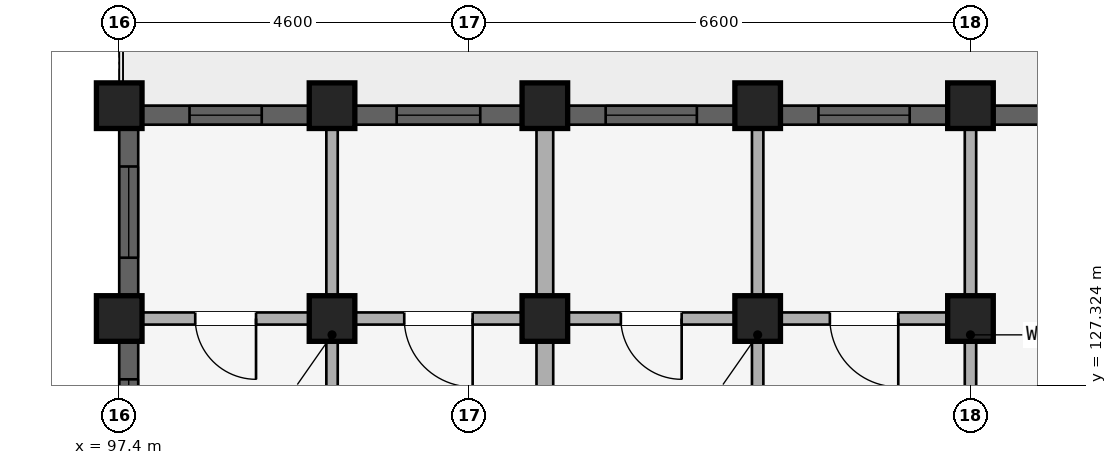
"""IFC4 building model, lengths in metres.
Left out: names, types, materials, properties, quantities, classifications, styles, units other than length and angle.
Written with IfcOpenShell. Run it as: python <this file> out.ifc"""

import sys

from ifc_helpers import new_model, si_unit, direction, frame, frame_2d, origin, origin_2d, place, context, subcontext, project, spatial, rectangle, extrude, element, fill, save


model = new_model("IFC4")
c1 = context("Model", 3, precision=1e-05, world=origin(), true_north=direction((0.0, 1.0)))
c2 = subcontext(c1, "Body", "Model", "MODEL_VIEW")
j1 = project(units=[si_unit("LENGTHUNIT", "METRE"), si_unit("PLANEANGLEUNIT", "RADIAN")], contexts=[c1])
p1 = place(None, origin())
s1 = spatial("IfcSite", under=j1, at=p1, CompositionType="ELEMENT")
p2 = place(p1, origin())
s2 = spatial("IfcBuilding", under=s1, at=p2, CompositionType="ELEMENT")
p3 = place(p2, frame((0.0, 0.0, 30.75)))
s3 = spatial("IfcBuildingStorey", under=s2, at=p3, CompositionType="ELEMENT", Elevation=30.75)
p4 = place(p3, frame((108.6, 128.2, 0.0), z_axis=(0.0, 0.0, 1.0), x_axis=(1.0, 0.0, 0.0)))
e1 = element("IfcColumn", 1, at=p4, inside=s3, PredefinedType="COLUMN", context=c2, shape_type="SweptSolid", body=[
    extrude(rectangle(XDim=0.6, YDim=0.6, at=origin_2d()), origin(), (0.0, 0.0, 1.0), 2.93),
])
p5 = place(p3, frame((108.6, 131.0, 0.0), z_axis=(0.0, 0.0, 1.0), x_axis=(1.0, 0.0, 0.0)))
e2 = element("IfcColumn", 2, at=p5, inside=s3, PredefinedType="COLUMN", context=c2, shape_type="SweptSolid", body=[
    extrude(rectangle(XDim=0.6, YDim=0.6, at=origin_2d()), origin(), (0.0, 0.0, 1.0), 2.97),
])
p6 = place(p3, frame((105.8, 128.2, 0.0), z_axis=(0.0, 0.0, 1.0), x_axis=(1.0, 0.0, 0.0)))
e3 = element("IfcColumn", 3, at=p6, inside=s3, PredefinedType="COLUMN", context=c2, shape_type="SweptSolid", body=[
    extrude(rectangle(XDim=0.6, YDim=0.6, at=origin_2d()), origin(), (0.0, 0.0, 1.0), 2.93),
])
p7 = place(p3, frame((105.8, 131.0, 0.0), z_axis=(0.0, 0.0, 1.0), x_axis=(1.0, 0.0, 0.0)))
e4 = element("IfcColumn", 4, at=p7, inside=s3, PredefinedType="COLUMN", context=c2, shape_type="SweptSolid", body=[
    extrude(rectangle(XDim=0.6, YDim=0.6, at=origin_2d()), origin(), (0.0, 0.0, 1.0), 2.97),
])
p8 = place(p3, frame((103.0, 128.2, 0.0), z_axis=(0.0, 0.0, 1.0), x_axis=(1.0, 0.0, 0.0)))
e5 = element("IfcColumn", 5, at=p8, inside=s3, PredefinedType="COLUMN", context=c2, shape_type="SweptSolid", body=[
    extrude(rectangle(XDim=0.6, YDim=0.6, at=origin_2d()), origin(), (0.0, 0.0, 1.0), 2.93),
])
p9 = place(p3, frame((103.0, 131.0, 0.0), z_axis=(0.0, 0.0, 1.0), x_axis=(1.0, 0.0, 0.0)))
e6 = element("IfcColumn", 6, at=p9, inside=s3, PredefinedType="COLUMN", context=c2, shape_type="SweptSolid", body=[
    extrude(rectangle(XDim=0.6, YDim=0.6, at=origin_2d()), origin(), (0.0, 0.0, 1.0), 2.97),
])
p10 = place(p3, frame((100.2, 128.2, 0.0), z_axis=(0.0, 0.0, 1.0), x_axis=(1.0, 0.0, 0.0)))
e7 = element("IfcColumn", 7, at=p10, inside=s3, PredefinedType="COLUMN", context=c2, shape_type="SweptSolid", body=[
    extrude(rectangle(XDim=0.6, YDim=0.6, at=origin_2d()), origin(), (0.0, 0.0, 1.0), 2.93),
])
p11 = place(p3, frame((100.2, 131.0, 0.0), z_axis=(0.0, 0.0, 1.0), x_axis=(1.0, 0.0, 0.0)))
e8 = element("IfcColumn", 8, at=p11, inside=s3, PredefinedType="COLUMN", context=c2, shape_type="SweptSolid", body=[
    extrude(rectangle(XDim=0.6, YDim=0.6, at=origin_2d()), origin(), (0.0, 0.0, 1.0), 2.97),
])
p12 = place(p3, frame((97.4, 128.2, 0.0), z_axis=(0.0, 0.0, 1.0), x_axis=(1.0, 0.0, 0.0)))
e9 = element("IfcColumn", 9, at=p12, inside=s3, PredefinedType="COLUMN", context=c2, shape_type="SweptSolid", body=[
    extrude(rectangle(XDim=0.6, YDim=0.6, at=origin_2d()), origin(), (0.0, 0.0, 1.0), 2.93),
])
p13 = place(p3, frame((97.4, 131.0, 0.0), z_axis=(0.0, 0.0, 1.0), x_axis=(1.0, 0.0, 0.0)))
e10 = element("IfcColumn", 10, at=p13, inside=s3, PredefinedType="COLUMN", context=c2, shape_type="SweptSolid", body=[
    extrude(rectangle(XDim=0.6, YDim=0.6, at=origin_2d()), origin(), (0.0, 0.0, 1.0), 2.97),
])
p14 = place(p3, frame((108.52, 128.2, 0.0), z_axis=(0.0, 0.0, 1.0), x_axis=(-1.0, 0.0, 0.0)))
e11 = element("IfcWall", 11, at=p14, inside=s3, PredefinedType="PLUMBINGWALL", context=c2, shape_type="SweptSolid", body=[
    extrude(rectangle(XDim=2.64, YDim=0.16, at=frame_2d((1.32, 0.0))), origin(), (0.0, 0.0, 1.0), 2.372),
])
p15 = place(p14, frame((0.87, 0.0, 0.0)))
e12 = element("IfcOpeningElement", 12, at=p15, cuts=e11, PredefinedType="OPENING", context=c2, shape_type="SweptSolid", body=[
    extrude(rectangle(XDim=0.9, YDim=2.1, at=frame_2d((0.45, 1.05))), frame((0.0, 0.09, 0.0), z_axis=(0.0, -1.0, 0.0), x_axis=(1.0, 0.0, 0.0)), (0.0, 0.0, 1.0), 0.18),
])
p16 = place(p3, frame((105.72, 128.2, 0.0), z_axis=(0.0, 0.0, 1.0), x_axis=(-1.0, 0.0, 0.0)))
e13 = element("IfcWall", 13, at=p16, inside=s3, PredefinedType="PLUMBINGWALL", context=c2, shape_type="SweptSolid", body=[
    extrude(rectangle(XDim=2.64, YDim=0.16, at=frame_2d((1.32, 0.0))), origin(), (0.0, 0.0, 1.0), 2.372),
])
p17 = place(p16, frame((0.92, 0.0, 0.0)))
e14 = element("IfcOpeningElement", 14, at=p17, cuts=e13, PredefinedType="OPENING", context=c2, shape_type="SweptSolid", body=[
    extrude(rectangle(XDim=0.8, YDim=2.1, at=frame_2d((0.4, 1.05))), frame((0.0, 0.09, 0.0), z_axis=(0.0, -1.0, 0.0), x_axis=(1.0, 0.0, 0.0)), (0.0, 0.0, 1.0), 0.18),
])
p18 = place(p3, frame((102.92, 128.2, 0.0), z_axis=(0.0, 0.0, 1.0), x_axis=(-1.0, 0.0, 0.0)))
e15 = element("IfcWall", 15, at=p18, inside=s3, PredefinedType="PLUMBINGWALL", context=c2, shape_type="SweptSolid", body=[
    extrude(rectangle(XDim=2.64, YDim=0.16, at=frame_2d((1.32, 0.0))), origin(), (0.0, 0.0, 1.0), 2.372),
])
p19 = place(p18, frame((0.87, 0.0, 0.0)))
e16 = element("IfcOpeningElement", 16, at=p19, cuts=e15, PredefinedType="OPENING", context=c2, shape_type="SweptSolid", body=[
    extrude(rectangle(XDim=0.9, YDim=2.1, at=frame_2d((0.45, 1.05))), frame((0.0, 0.09, 0.0), z_axis=(0.0, -1.0, 0.0), x_axis=(1.0, 0.0, 0.0)), (0.0, 0.0, 1.0), 0.18),
])
p20 = place(p3, frame((100.12, 128.2, 0.0), z_axis=(0.0, 0.0, 1.0), x_axis=(-1.0, 0.0, 0.0)))
e17 = element("IfcWall", 17, at=p20, inside=s3, PredefinedType="PLUMBINGWALL", context=c2, shape_type="SweptSolid", body=[
    extrude(rectangle(XDim=2.64, YDim=0.16, at=frame_2d((1.32, 0.0))), origin(), (0.0, 0.0, 1.0), 2.372),
])
p21 = place(p20, frame((0.92, 0.0, 0.0)))
e18 = element("IfcOpeningElement", 18, at=p21, cuts=e17, PredefinedType="OPENING", context=c2, shape_type="SweptSolid", body=[
    extrude(rectangle(XDim=0.8, YDim=2.1, at=frame_2d((0.4, 1.05))), frame((0.0, 0.09, 0.0), z_axis=(0.0, -1.0, 0.0), x_axis=(1.0, 0.0, 0.0)), (0.0, 0.0, 1.0), 0.18),
])
p22 = place(p3, frame((108.6, 122.7, 0.0), z_axis=(0.0, 0.0, 1.0), x_axis=(0.0, 1.0, 0.0)))
e19 = element("IfcWall", 19, at=p22, inside=s3, PredefinedType="PARTITIONING", context=c2, shape_type="SweptSolid", body=[
    extrude(rectangle(XDim=8.02, YDim=0.15, at=frame_2d((4.01, 0.0))), origin(), (0.0, 0.0, 1.0), 2.372),
])
p23 = place(p22, frame((0.9, 0.0, 0.0)))
e20 = element("IfcOpeningElement", 20, at=p23, cuts=e19, PredefinedType="OPENING", context=c2, shape_type="SweptSolid", body=[
    extrude(rectangle(XDim=0.8, YDim=2.1, at=frame_2d((0.4, 1.05))), frame((0.0, 0.085, 0.0), z_axis=(0.0, -1.0, 0.0), x_axis=(1.0, 0.0, 0.0)), (0.0, 0.0, 1.0), 0.17),
])
p24 = place(p3, frame((105.8, 122.7, 0.0), z_axis=(0.0, 0.0, 1.0), x_axis=(0.0, 1.0, 0.0)))
e21 = element("IfcWall", 21, at=p24, inside=s3, PredefinedType="PARTITIONING", context=c2, shape_type="SweptSolid", body=[
    extrude(rectangle(XDim=8.02, YDim=0.15, at=frame_2d((4.01, 0.0))), origin(), (0.0, 0.0, 1.0), 2.372),
])
p25 = place(p24, frame((0.9, 0.0, 0.0)))
e22 = element("IfcOpeningElement", 22, at=p25, cuts=e21, PredefinedType="OPENING", context=c2, shape_type="SweptSolid", body=[
    extrude(rectangle(XDim=0.8, YDim=2.1, at=frame_2d((0.4, 1.05))), frame((0.0, 0.085, 0.0), z_axis=(0.0, -1.0, 0.0), x_axis=(1.0, 0.0, 0.0)), (0.0, 0.0, 1.0), 0.17),
])
p26 = place(p3, frame((103.0, 122.7, 0.0), z_axis=(0.0, 0.0, 1.0), x_axis=(0.0, 1.0, 0.0)))
e23 = element("IfcWall", 23, at=p26, inside=s3, PredefinedType="STANDARD", context=c2, shape_type="SweptSolid", body=[
    extrude(rectangle(XDim=8.02, YDim=0.22, at=frame_2d((4.01, 0.0))), origin(), (0.0, 0.0, 1.0), 2.372),
])
p27 = place(p3, frame((100.2, 122.7, 0.0), z_axis=(0.0, 0.0, 1.0), x_axis=(0.0, 1.0, 0.0)))
e24 = element("IfcWall", 24, at=p27, inside=s3, PredefinedType="PARTITIONING", context=c2, shape_type="SweptSolid", body=[
    extrude(rectangle(XDim=8.02, YDim=0.15, at=frame_2d((4.01, 0.0))), origin(), (0.0, 0.0, 1.0), 2.372),
])
p28 = place(p27, frame((0.9, 0.0, 0.0)))
e25 = element("IfcOpeningElement", 25, at=p28, cuts=e24, PredefinedType="OPENING", context=c2, shape_type="SweptSolid", body=[
    extrude(rectangle(XDim=0.8, YDim=2.1, at=frame_2d((0.4, 1.05))), frame((0.0, 0.085, 0.0), z_axis=(0.0, -1.0, 0.0), x_axis=(1.0, 0.0, 0.0)), (0.0, 0.0, 1.0), 0.17),
])
p29 = place(p3, frame((113.896, 130.875, 0.0), z_axis=(0.0, 0.0, 1.0), x_axis=(-1.0, 0.0, 0.0)))
e26 = element("IfcWall", 26, at=p29, inside=s3, PredefinedType="STANDARD", context=c2, shape_type="SweptSolid", body=[
    extrude(rectangle(XDim=4.993, YDim=0.25, at=frame_2d((2.497, 0.0))), origin(), (0.0, 0.0, 1.0), 2.48),
])
p30 = place(p29, frame((2.021, 0.0, 0.88)))
e27 = element("IfcOpeningElement", 27, at=p30, cuts=e26, PredefinedType="OPENING", context=c2, shape_type="SweptSolid", body=[
    extrude(rectangle(XDim=0.95, YDim=1.35, at=frame_2d((0.475, 0.675))), frame((0.0, 0.135, 0.0), z_axis=(0.0, -1.0, 0.0), x_axis=(1.0, 0.0, 0.0)), (0.0, 0.0, 1.0), 0.27),
])
p31 = place(p3, frame((108.296, 130.875, 0.0), z_axis=(0.0, 0.0, 1.0), x_axis=(-1.0, 0.0, 0.0)))
e28 = element("IfcWall", 28, at=p31, inside=s3, PredefinedType="STANDARD", context=c2, shape_type="SweptSolid", body=[
    extrude(rectangle(XDim=2.193, YDim=0.25, at=frame_2d((1.096, 0.0))), origin(), (0.0, 0.0, 1.0), 2.48),
])
p32 = place(p31, frame((0.497, 0.0, 0.78)))
e29 = element("IfcOpeningElement", 29, at=p32, cuts=e28, PredefinedType="OPENING", context=c2, shape_type="SweptSolid", body=[
    extrude(rectangle(XDim=1.2, YDim=1.5, at=frame_2d((0.6, 0.75))), frame((0.0, 0.135, 0.0), z_axis=(0.0, -1.0, 0.0), x_axis=(1.0, 0.0, 0.0)), (0.0, 0.0, 1.0), 0.27),
])
p33 = place(p3, frame((105.497, 130.875, 0.0), z_axis=(0.0, 0.0, 1.0), x_axis=(-1.0, 0.0, 0.0)))
e30 = element("IfcWall", 30, at=p33, inside=s3, PredefinedType="STANDARD", context=c2, shape_type="SweptSolid", body=[
    extrude(rectangle(XDim=2.193, YDim=0.25, at=frame_2d((1.097, 0.0))), origin(), (0.0, 0.0, 1.0), 2.48),
])
p34 = place(p33, frame((0.497, 0.0, 0.78)))
e31 = element("IfcOpeningElement", 31, at=p34, cuts=e30, PredefinedType="OPENING", context=c2, shape_type="SweptSolid", body=[
    extrude(rectangle(XDim=1.2, YDim=1.5, at=frame_2d((0.6, 0.75))), frame((0.0, 0.135, 0.0), z_axis=(0.0, -1.0, 0.0), x_axis=(1.0, 0.0, 0.0)), (0.0, 0.0, 1.0), 0.27),
])
p35 = place(p3, frame((102.697, 130.875, 0.0), z_axis=(0.0, 0.0, 1.0), x_axis=(-1.0, 0.0, 0.0)))
e32 = element("IfcWall", 32, at=p35, inside=s3, PredefinedType="STANDARD", context=c2, shape_type="SweptSolid", body=[
    extrude(rectangle(XDim=2.193, YDim=0.25, at=frame_2d((1.097, 0.0))), origin(), (0.0, 0.0, 1.0), 2.48),
])
p36 = place(p35, frame((0.546, 0.0, 0.83)))
e33 = element("IfcOpeningElement", 33, at=p36, cuts=e32, PredefinedType="OPENING", context=c2, shape_type="SweptSolid", body=[
    extrude(rectangle(XDim=1.1, YDim=1.45, at=frame_2d((0.55, 0.725))), frame((0.0, 0.135, 0.0), z_axis=(0.0, -1.0, 0.0), x_axis=(1.0, 0.0, 0.0)), (0.0, 0.0, 1.0), 0.27),
])
p37 = place(p3, frame((99.896, 130.875, 0.0), z_axis=(0.0, 0.0, 1.0), x_axis=(-1.0, 0.0, 0.0)))
e34 = element("IfcWall", 34, at=p37, inside=s3, PredefinedType="STANDARD", context=c2, shape_type="SweptSolid", body=[
    extrude(rectangle(XDim=2.193, YDim=0.25, at=frame_2d((1.096, 0.0))), origin(), (0.0, 0.0, 1.0), 2.48),
])
p38 = place(p37, frame((0.622, 0.0, 0.88)))
e35 = element("IfcOpeningElement", 35, at=p38, cuts=e34, PredefinedType="OPENING", context=c2, shape_type="SweptSolid", body=[
    extrude(rectangle(XDim=0.95, YDim=1.35, at=frame_2d((0.475, 0.675))), frame((0.0, 0.135, 0.0), z_axis=(0.0, -1.0, 0.0), x_axis=(1.0, 0.0, 0.0)), (0.0, 0.0, 1.0), 0.27),
])
p39 = place(p3, frame((97.525, 125.704, 0.0), z_axis=(0.0, 0.0, 1.0), x_axis=(0.0, 1.0, 0.0)))
e36 = element("IfcWall", 36, at=p39, inside=s3, PredefinedType="STANDARD", context=c2, shape_type="SweptSolid", body=[
    extrude(rectangle(XDim=2.193, YDim=0.25, at=frame_2d((1.096, 0.0))), origin(), (0.0, 0.0, 1.0), 2.372),
])
p40 = place(p39, frame((0.497, 0.0, 0.672)))
e37 = element("IfcOpeningElement", 37, at=p40, cuts=e36, PredefinedType="OPENING", context=c2, shape_type="SweptSolid", body=[
    extrude(rectangle(XDim=1.2, YDim=1.5, at=frame_2d((0.6, 0.75))), frame((0.0, 0.135, 0.0), z_axis=(0.0, -1.0, 0.0), x_axis=(1.0, 0.0, 0.0)), (0.0, 0.0, 1.0), 0.27),
])
p41 = place(p3, frame((97.525, 128.503, 0.0), z_axis=(0.0, 0.0, 1.0), x_axis=(0.0, 1.0, 0.0)))
e38 = element("IfcWall", 38, at=p41, inside=s3, PredefinedType="STANDARD", context=c2, shape_type="SweptSolid", body=[
    extrude(rectangle(XDim=2.193, YDim=0.25, at=frame_2d((1.097, 0.0))), origin(), (0.0, 0.0, 1.0), 2.412),
])
p42 = place(p41, frame((0.497, 0.0, 0.712)))
e39 = element("IfcOpeningElement", 39, at=p42, cuts=e38, PredefinedType="OPENING", context=c2, shape_type="SweptSolid", body=[
    extrude(rectangle(XDim=1.2, YDim=1.5, at=frame_2d((0.6, 0.75))), frame((0.0, 0.135, 0.0), z_axis=(0.0, -1.0, 0.0), x_axis=(1.0, 0.0, 0.0)), (0.0, 0.0, 1.0), 0.27),
])
p43 = place(p32, origin())
e40 = element("IfcWindow", 40, at=p43, inside=s3, PartitioningType="SINGLE_PANEL", PredefinedType="WINDOW", context=c2, shape_type="SweptSolid", body=[
    extrude(rectangle(XDim=1.2, YDim=1.5, at=frame_2d((0.6, 0.75))), frame((0.0, 0.03, 0.0), z_axis=(0.0, -1.0, 0.0), x_axis=(1.0, 0.0, 0.0)), (0.0, 0.0, 1.0), 0.06),
])
fill(e29, e40)
p44 = place(p34, origin())
e41 = element("IfcWindow", 41, at=p44, inside=s3, PartitioningType="SINGLE_PANEL", PredefinedType="WINDOW", context=c2, shape_type="SweptSolid", body=[
    extrude(rectangle(XDim=1.2, YDim=1.5, at=frame_2d((0.6, 0.75))), frame((0.0, 0.03, 0.0), z_axis=(0.0, -1.0, 0.0), x_axis=(1.0, 0.0, 0.0)), (0.0, 0.0, 1.0), 0.06),
])
fill(e31, e41)
p45 = place(p36, origin())
e42 = element("IfcWindow", 42, at=p45, inside=s3, PartitioningType="SINGLE_PANEL", PredefinedType="WINDOW", context=c2, shape_type="SweptSolid", body=[
    extrude(rectangle(XDim=1.1, YDim=1.45, at=frame_2d((0.55, 0.725))), frame((0.0, 0.03, 0.0), z_axis=(0.0, -1.0, 0.0), x_axis=(1.0, 0.0, 0.0)), (0.0, 0.0, 1.0), 0.06),
])
fill(e33, e42)
p46 = place(p38, origin())
e43 = element("IfcWindow", 43, at=p46, inside=s3, PartitioningType="SINGLE_PANEL", PredefinedType="WINDOW", context=c2, shape_type="SweptSolid", body=[
    extrude(rectangle(XDim=0.95, YDim=1.35, at=frame_2d((0.475, 0.675))), frame((0.0, 0.03, 0.0), z_axis=(0.0, -1.0, 0.0), x_axis=(1.0, 0.0, 0.0)), (0.0, 0.0, 1.0), 0.06),
])
fill(e35, e43)
p47 = place(p40, origin())
e44 = element("IfcWindow", 44, at=p47, inside=s3, PartitioningType="SINGLE_PANEL", PredefinedType="WINDOW", context=c2, shape_type="SweptSolid", body=[
    extrude(rectangle(XDim=1.2, YDim=1.5, at=frame_2d((0.6, 0.75))), frame((0.0, 0.03, 0.0), z_axis=(0.0, -1.0, 0.0), x_axis=(1.0, 0.0, 0.0)), (0.0, 0.0, 1.0), 0.06),
])
fill(e37, e44)
p48 = place(p42, origin())
e45 = element("IfcWindow", 45, at=p48, inside=s3, PartitioningType="SINGLE_PANEL", PredefinedType="WINDOW", context=c2, shape_type="SweptSolid", body=[
    extrude(rectangle(XDim=1.2, YDim=1.5, at=frame_2d((0.6, 0.75))), frame((0.0, 0.03, 0.0), z_axis=(0.0, -1.0, 0.0), x_axis=(1.0, 0.0, 0.0)), (0.0, 0.0, 1.0), 0.06),
])
fill(e39, e45)
p49 = place(p15, frame((0.9, 0.0, 0.0), z_axis=(0.0, 0.0, 1.0), x_axis=(-1.0, 0.0, 0.0)))
e46 = element("IfcDoor", 46, at=p49, inside=s3, OperationType="SINGLE_SWING_RIGHT", PredefinedType="DOOR", context=c2, shape_type="SweptSolid", body=[
    extrude(rectangle(XDim=0.9, YDim=2.1, at=frame_2d((0.45, 1.05))), frame((0.0, 0.025, 0.0), z_axis=(0.0, -1.0, 0.0), x_axis=(1.0, 0.0, 0.0)), (0.0, 0.0, 1.0), 0.05),
])
fill(e12, e46)
p50 = place(p17, frame((0.8, 0.0, 0.0), z_axis=(0.0, 0.0, 1.0), x_axis=(-1.0, 0.0, 0.0)))
e47 = element("IfcDoor", 47, at=p50, inside=s3, OperationType="SINGLE_SWING_RIGHT", PredefinedType="DOOR", context=c2, shape_type="SweptSolid", body=[
    extrude(rectangle(XDim=0.8, YDim=2.1, at=frame_2d((0.4, 1.05))), frame((0.0, 0.025, 0.0), z_axis=(0.0, -1.0, 0.0), x_axis=(1.0, 0.0, 0.0)), (0.0, 0.0, 1.0), 0.05),
])
fill(e14, e47)
p51 = place(p19, frame((0.9, 0.0, 0.0), z_axis=(0.0, 0.0, 1.0), x_axis=(-1.0, 0.0, 0.0)))
e48 = element("IfcDoor", 48, at=p51, inside=s3, OperationType="SINGLE_SWING_RIGHT", PredefinedType="DOOR", context=c2, shape_type="SweptSolid", body=[
    extrude(rectangle(XDim=0.9, YDim=2.1, at=frame_2d((0.45, 1.05))), frame((0.0, 0.025, 0.0), z_axis=(0.0, -1.0, 0.0), x_axis=(1.0, 0.0, 0.0)), (0.0, 0.0, 1.0), 0.05),
])
fill(e16, e48)
p52 = place(p21, frame((0.8, 0.0, 0.0), z_axis=(0.0, 0.0, 1.0), x_axis=(-1.0, 0.0, 0.0)))
e49 = element("IfcDoor", 49, at=p52, inside=s3, OperationType="SINGLE_SWING_RIGHT", PredefinedType="DOOR", context=c2, shape_type="SweptSolid", body=[
    extrude(rectangle(XDim=0.8, YDim=2.1, at=frame_2d((0.4, 1.05))), frame((0.0, 0.025, 0.0), z_axis=(0.0, -1.0, 0.0), x_axis=(1.0, 0.0, 0.0)), (0.0, 0.0, 1.0), 0.05),
])
fill(e18, e49)
save(model, sys.argv[1])
